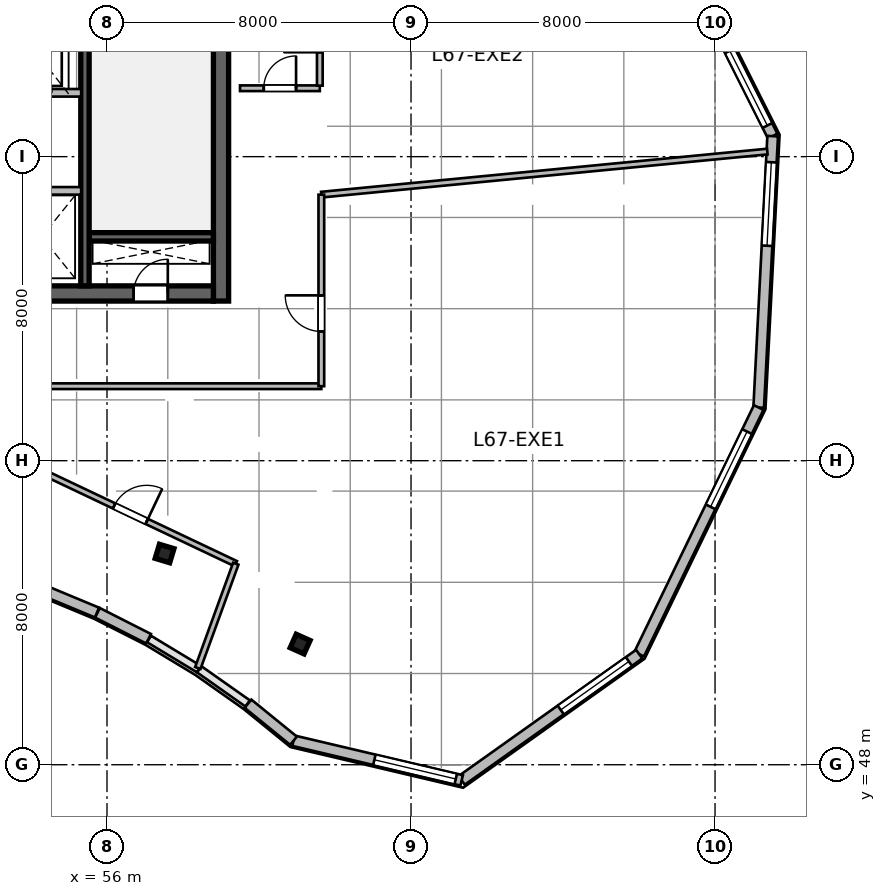
"""IFC4 building model, lengths in metres.
Left out: names, types, materials, properties, quantities, classifications, styles, units other than length and angle.
Written with IfcOpenShell. Run it as: python <this file> out.ifc"""

import sys

from ifc_helpers import new_model, si_unit, direction, frame, frame_2d, origin, origin_2d, place, context, subcontext, project, spatial, rectangle, i_section, extrude, source, transform, mapped, element, fill, save


model = new_model("IFC4")
c1 = context("Model", 3, precision=1e-05, world=origin(), true_north=direction((0.0, 1.0)))
c2 = subcontext(c1, "Body", "Model", "MODEL_VIEW")
j1 = project(units=[si_unit("LENGTHUNIT", "METRE"), si_unit("PLANEANGLEUNIT", "RADIAN")], contexts=[c1])
p1 = place(None, origin())
s1 = spatial("IfcSite", under=j1, at=p1, CompositionType="ELEMENT")
p2 = place(p1, origin())
s2 = spatial("IfcBuilding", under=s1, at=p2, CompositionType="ELEMENT")
p3 = place(p2, frame((0.0, 0.0, 275.7)))
s3 = spatial("IfcBuildingStorey", under=s2, at=p3, CompositionType="ELEMENT", Elevation=275.7)
m1 = source(origin(), c2, "Body", "SweptSolid", [
    extrude(rectangle(XDim=12.0, YDim=0.4, at=frame_2d((6.0, 0.0))), origin(), (0.0, 0.0, 1.0), 3.9),
])
p4 = place(p3, frame((59.0, 60.2, 0.0), z_axis=(0.0, 0.0, 1.0), x_axis=(0.0, 1.0, 0.0)))
e1 = element("IfcWall", 1, at=p4, inside=s3, PredefinedType="SHEAR", context=c2, shape_type="MappedRepresentation", body=[
    mapped(m1, transform((0.0, 0.0, 0.0), scale=1.0)),
])
m2 = source(origin(), c2, "Body", "SweptSolid", [
    extrude(rectangle(XDim=21.6, YDim=0.4, at=frame_2d((10.8, 0.0))), origin(), (0.0, 0.0, 1.0), 3.9),
])
p5 = place(p3, frame((37.2, 60.4, 0.0), z_axis=(0.0, 0.0, 1.0), x_axis=(1.0, 0.0, 0.0)))
e2 = element("IfcWall", 2, at=p5, inside=s3, PredefinedType="SHEAR", context=c2, shape_type="MappedRepresentation", body=[
    mapped(m2, transform((0.0, 0.0, 0.0), scale=1.0)),
])
p6 = place(p5, frame((1.1, 0.0, 0.0)))
e3 = element("IfcOpeningElement", 3, at=p6, cuts=e2, PredefinedType="OPENING", context=c2, shape_type="SweptSolid", body=[
    extrude(rectangle(XDim=1.15, YDim=2.15, at=frame_2d((0.575, 1.075))), frame((0.0, 0.21, 0.0), z_axis=(0.0, -1.0, 0.0), x_axis=(1.0, 0.0, 0.0)), (0.0, 0.0, 1.0), 0.42),
])
p7 = place(p5, frame((19.5, 0.0, 0.0)))
e4 = element("IfcOpeningElement", 4, at=p7, cuts=e2, PredefinedType="OPENING", context=c2, shape_type="SweptSolid", body=[
    extrude(rectangle(XDim=0.9, YDim=2.1, at=frame_2d((0.45, 1.05))), frame((0.0, 0.21, 0.0), z_axis=(0.0, -1.0, 0.0), x_axis=(1.0, 0.0, 0.0)), (0.0, 0.0, 1.0), 0.42),
])
p8 = place(p5, frame((12.02, 0.0, 0.0)))
e5 = element("IfcOpeningElement", 5, at=p8, cuts=e2, PredefinedType="OPENING", context=c2, shape_type="SweptSolid", body=[
    extrude(rectangle(XDim=1.6, YDim=2.15, at=frame_2d((0.8, 1.075))), frame((0.0, 0.21, 0.0), z_axis=(0.0, -1.0, 0.0), x_axis=(1.0, 0.0, 0.0)), (0.0, 0.0, 1.0), 0.42),
])
m3 = source(origin(), c2, "Body", "SweptSolid", [
    extrude(rectangle(XDim=3.27, YDim=0.22, at=frame_2d((1.635, 0.0))), origin(), (0.0, 0.0, 1.0), 3.9),
])
p9 = place(p3, frame((55.53, 61.89, 0.0), z_axis=(0.0, 0.0, 1.0), x_axis=(1.0, 0.0, 0.0)))
e6 = element("IfcWall", 6, at=p9, inside=s3, PredefinedType="SHEAR", context=c2, shape_type="MappedRepresentation", body=[
    mapped(m3, transform((0.0, 0.0, 0.0), scale=1.0)),
])
m4 = source(origin(), c2, "Body", "SweptSolid", [
    extrude(rectangle(XDim=11.2, YDim=0.22, at=frame_2d((5.6, 0.0))), origin(), (0.0, 0.0, 1.0), 3.9),
])
p10 = place(p3, frame((55.42, 60.6, 0.0), z_axis=(0.0, 0.0, 1.0), x_axis=(0.0, 1.0, 0.0)))
e7 = element("IfcWall", 7, at=p10, inside=s3, PredefinedType="SHEAR", context=c2, shape_type="MappedRepresentation", body=[
    mapped(m4, transform((0.0, 0.0, 0.0), scale=1.0)),
])
p11 = place(p10, frame((9.645, 0.0, 0.0)))
e8 = element("IfcOpeningElement", 8, at=p11, cuts=e7, PredefinedType="OPENING", context=c2, shape_type="SweptSolid", body=[
    extrude(rectangle(XDim=1.15, YDim=2.15, at=frame_2d((0.575, 1.075))), frame((0.0, 0.12, 0.0), z_axis=(0.0, -1.0, 0.0), x_axis=(1.0, 0.0, 0.0)), (0.0, 0.0, 1.0), 0.24),
])
m5 = source(origin(), c2, "Body", "SweptSolid", [
    extrude(i_section(OverallWidth=0.399, OverallDepth=0.387, WebThickness=0.021, FlangeThickness=0.033, at=origin_2d()), origin(), (0.0, 0.0, 1.0), 3.9),
])
for number, where, z_axis, x_axis in (
    (9, (57.515, 53.558, 0.0), (0.0, 0.0, 1.0), (0.289, 0.957, 0.0)),
    (10, (61.082, 51.175, 0.0), (0.0, 0.0, 1.0), (0.409, 0.912, 0.0)),
):
    element("IfcColumn", number, at=place(p3, frame(where, z_axis=z_axis, x_axis=x_axis)), inside=s3, PredefinedType="COLUMN", context=c2, shape_type="MappedRepresentation", body=[
        mapped(m5, transform((0.0, 0.0, 0.0), scale=1.0)),
    ])
m6 = source(origin(), c2, "Body", "SweptSolid", [
    extrude(rectangle(XDim=5.653, YDim=0.28, at=frame_2d((2.827, 0.0))), origin(), (0.0, 0.0, 1.0), 3.64),
])
p12 = place(p3, frame((70.976, 69.591, 0.0), z_axis=(0.0, 0.0, 1.0), x_axis=(0.449302555419, -0.893379658205, 0.0)))
e11 = element("IfcWall", 11, at=p12, inside=s3, PredefinedType="SOLIDWALL", context=c2, shape_type="MappedRepresentation", body=[
    mapped(m6, transform((0.0, 0.0, 0.0), scale=1.0)),
])
p13 = place(p12, frame((3.14, 0.0, 0.95)))
e12 = element("IfcOpeningElement", 12, at=p13, cuts=e11, PredefinedType="OPENING", context=c2, shape_type="SweptSolid", body=[
    extrude(rectangle(XDim=2.2, YDim=2.1, at=frame_2d((1.1, 1.05))), frame((0.0, 0.15, 0.0), z_axis=(0.0, -1.0, 0.0), x_axis=(1.0, 0.0, 0.0)), (0.0, 0.0, 1.0), 0.3),
])
m7 = source(origin(), c2, "Body", "SweptSolid", [
    extrude(rectangle(XDim=7.151, YDim=0.28, at=frame_2d((3.576, 0.0))), origin(), (0.0, 0.0, 1.0), 3.64),
])
p14 = place(p3, frame((73.516, 64.54, 0.0), z_axis=(0.0, 0.0, 1.0), x_axis=(-0.051449614265, -0.998675591567, 0.0)))
e13 = element("IfcWall", 13, at=p14, inside=s3, PredefinedType="SOLIDWALL", context=c2, shape_type="MappedRepresentation", body=[
    mapped(m7, transform((0.0, 0.0, 0.0), scale=1.0)),
])
p15 = place(p14, frame((0.688, 0.0, 0.95)))
e14 = element("IfcOpeningElement", 14, at=p15, cuts=e13, PredefinedType="OPENING", context=c2, shape_type="SweptSolid", body=[
    extrude(rectangle(XDim=2.2, YDim=2.1, at=frame_2d((1.1, 1.05))), frame((0.0, 0.15, 0.0), z_axis=(0.0, -1.0, 0.0), x_axis=(1.0, 0.0, 0.0)), (0.0, 0.0, 1.0), 0.3),
])
m8 = source(origin(), c2, "Body", "SweptSolid", [
    extrude(rectangle(XDim=7.211, YDim=0.28, at=frame_2d((3.606, 0.0))), origin(), (0.0, 0.0, 1.0), 3.64),
])
p16 = place(p3, frame((73.148, 57.399, 0.0), z_axis=(0.0, 0.0, 1.0), x_axis=(-0.436088263006, -0.899903898685, 0.0)))
e15 = element("IfcWall", 15, at=p16, inside=s3, PredefinedType="SOLIDWALL", context=c2, shape_type="MappedRepresentation", body=[
    mapped(m8, transform((0.0, 0.0, 0.0), scale=1.0)),
])
p17 = place(p16, frame((0.703, 0.0, 0.95)))
e16 = element("IfcOpeningElement", 16, at=p17, cuts=e15, PredefinedType="OPENING", context=c2, shape_type="SweptSolid", body=[
    extrude(rectangle(XDim=2.2, YDim=2.1, at=frame_2d((1.1, 1.05))), frame((0.0, 0.15, 0.0), z_axis=(0.0, -1.0, 0.0), x_axis=(1.0, 0.0, 0.0)), (0.0, 0.0, 1.0), 0.3),
])
m9 = source(origin(), c2, "Body", "SweptSolid", [
    extrude(rectangle(XDim=5.731, YDim=0.28, at=frame_2d((2.865, 0.0))), origin(), (0.0, 0.0, 1.0), 3.64),
])
p18 = place(p3, frame((70.004, 50.909, 0.0), z_axis=(0.0, 0.0, 1.0), x_axis=(-0.815021045908, -0.579431354629, 0.0)))
e17 = element("IfcWall", 17, at=p18, inside=s3, PredefinedType="SOLIDWALL", context=c2, shape_type="MappedRepresentation", body=[
    mapped(m9, transform((0.0, 0.0, 0.0), scale=1.0)),
])
p19 = place(p18, frame((0.333, 0.0, 0.95)))
e18 = element("IfcOpeningElement", 18, at=p19, cuts=e17, PredefinedType="OPENING", context=c2, shape_type="SweptSolid", body=[
    extrude(rectangle(XDim=2.2, YDim=2.1, at=frame_2d((1.1, 1.05))), frame((0.0, 0.15, 0.0), z_axis=(0.0, -1.0, 0.0), x_axis=(1.0, 0.0, 0.0)), (0.0, 0.0, 1.0), 0.3),
])
m10 = source(origin(), c2, "Body", "SweptSolid", [
    extrude(rectangle(XDim=4.547, YDim=0.28, at=frame_2d((2.273, 0.0))), origin(), (0.0, 0.0, 1.0), 3.64),
])
p20 = place(p3, frame((65.333, 47.589, 0.0), z_axis=(0.0, 0.0, 1.0), x_axis=(-0.973332593516, 0.229398479505, 0.0)))
e19 = element("IfcWall", 19, at=p20, inside=s3, PredefinedType="SOLIDWALL", context=c2, shape_type="MappedRepresentation", body=[
    mapped(m10, transform((0.0, 0.0, 0.0), scale=1.0)),
])
p21 = place(p20, frame((0.16, 0.0, 0.95)))
e20 = element("IfcOpeningElement", 20, at=p21, cuts=e19, PredefinedType="OPENING", context=c2, shape_type="SweptSolid", body=[
    extrude(rectangle(XDim=2.2, YDim=2.1, at=frame_2d((1.1, 1.05))), frame((0.0, 0.15, 0.0), z_axis=(0.0, -1.0, 0.0), x_axis=(1.0, 0.0, 0.0)), (0.0, 0.0, 1.0), 0.3),
])
m11 = source(origin(), c2, "Body", "SweptSolid", [
    extrude(rectangle(XDim=1.543, YDim=0.28, at=frame_2d((0.772, 0.0))), origin(), (0.0, 0.0, 1.0), 3.64),
])
p22 = place(p3, frame((60.908, 48.632, 0.0), z_axis=(0.0, 0.0, 1.0), x_axis=(-0.77582846857, 0.63094388606, 0.0)))
e21 = element("IfcWall", 21, at=p22, inside=s3, PredefinedType="SOLIDWALL", context=c2, shape_type="MappedRepresentation", body=[
    mapped(m11, transform((0.0, 0.0, 0.0), scale=1.0)),
])
m12 = source(origin(), c2, "Body", "SweptSolid", [
    extrude(rectangle(XDim=1.509, YDim=0.28, at=frame_2d((0.754, 0.0))), origin(), (0.0, 0.0, 1.0), 3.64),
])
p23 = place(p3, frame((57.094, 51.315, 0.0), z_axis=(0.0, 0.0, 1.0), x_axis=(-0.89169189228, 0.452642871635, 0.0)))
e22 = element("IfcWall", 22, at=p23, inside=s3, PredefinedType="SOLIDWALL", context=c2, shape_type="MappedRepresentation", body=[
    mapped(m12, transform((0.0, 0.0, 0.0), scale=1.0)),
])
m13 = source(origin(), c2, "Body", "SweptSolid", [
    extrude(rectangle(XDim=1.488, YDim=0.28, at=frame_2d((0.744, 0.0))), origin(), (0.0, 0.0, 1.0), 3.64),
])
p24 = place(p3, frame((55.736, 52.004, 0.0), z_axis=(0.0, 0.0, 1.0), x_axis=(-0.923261314935, 0.384172545017, 0.0)))
e23 = element("IfcWall", 23, at=p24, inside=s3, PredefinedType="SOLIDWALL", context=c2, shape_type="MappedRepresentation", body=[
    mapped(m13, transform((0.0, 0.0, 0.0), scale=1.0)),
])
m14 = source(origin(), c2, "Body", "SweptSolid", [
    extrude(rectangle(XDim=5.62, YDim=0.2, at=frame_2d((2.81, 0.0))), origin(), (0.0, 0.0, 1.0), 3.64),
])
p25 = place(p3, frame((49.7, 65.68, 0.0), z_axis=(0.0, 0.0, 1.0), x_axis=(1.0, 0.0, 0.0)))
e24 = element("IfcWall", 24, at=p25, inside=s3, PredefinedType="SOLIDWALL", context=c2, shape_type="MappedRepresentation", body=[
    mapped(m14, transform((0.0, 0.0, 0.0), scale=1.0)),
])
m15 = source(origin(), c2, "Body", "SweptSolid", [
    extrude(rectangle(XDim=4.1, YDim=0.2, at=frame_2d((2.05, 0.0))), origin(), (0.0, 0.0, 1.0), 3.64),
])
p26 = place(p3, frame((51.22, 63.1, 0.0), z_axis=(0.0, 0.0, 1.0), x_axis=(1.0, 0.0, 0.0)))
e25 = element("IfcWall", 25, at=p26, inside=s3, PredefinedType="SOLIDWALL", context=c2, shape_type="MappedRepresentation", body=[
    mapped(m15, transform((0.0, 0.0, 0.0), scale=1.0)),
])
m16 = source(origin(), c2, "Body", "SweptSolid", [
    extrude(rectangle(XDim=2.1, YDim=0.15, at=frame_2d((1.05, 0.0))), origin(), (0.0, 0.0, 1.0), 3.64),
])
p27 = place(p3, frame((59.5, 65.8, 0.0), z_axis=(0.0, 0.0, 1.0), x_axis=(1.0, 0.0, 0.0)))
e26 = element("IfcWall", 26, at=p27, inside=s3, PredefinedType="PARTITIONING", context=c2, shape_type="MappedRepresentation", body=[
    mapped(m16, transform((0.0, 0.0, 0.0), scale=1.0)),
])
p28 = place(p27, frame((0.625, 0.0, 0.0)))
e27 = element("IfcOpeningElement", 27, at=p28, cuts=e26, PredefinedType="OPENING", context=c2, shape_type="SweptSolid", body=[
    extrude(rectangle(XDim=0.85, YDim=2.1, at=frame_2d((0.425, 1.05))), frame((0.0, 0.085, 0.0), z_axis=(0.0, -1.0, 0.0), x_axis=(1.0, 0.0, 0.0)), (0.0, 0.0, 1.0), 0.17),
])
m17 = source(origin(), c2, "Body", "SweptSolid", [
    extrude(rectangle(XDim=3.565, YDim=0.15, at=frame_2d((1.783, 0.0))), origin(), (0.0, 0.0, 1.0), 3.64),
])
p29 = place(p3, frame((61.6, 65.867, 0.0), z_axis=(0.0, 0.0, 1.0), x_axis=(0.0, 1.0, 0.0)))
e28 = element("IfcWall", 28, at=p29, inside=s3, PredefinedType="PARTITIONING", context=c2, shape_type="MappedRepresentation", body=[
    mapped(m17, transform((0.0, 0.0, 0.0), scale=1.0)),
])
p30 = place(p29, frame((0.88, 0.0, 0.0)))
e29 = element("IfcOpeningElement", 29, at=p30, cuts=e28, PredefinedType="OPENING", context=c2, shape_type="SweptSolid", body=[
    extrude(rectangle(XDim=0.95, YDim=2.1, at=frame_2d((0.475, 1.05))), frame((0.0, 0.085, 0.0), z_axis=(0.0, -1.0, 0.0), x_axis=(1.0, 0.0, 0.0)), (0.0, 0.0, 1.0), 0.17),
])
m18 = source(origin(), c2, "Body", "SweptSolid", [
    extrude(rectangle(XDim=6.137, YDim=0.15, at=frame_2d((3.069, 0.0))), origin(), (0.0, 0.0, 1.0), 3.64),
])
p31 = place(p3, frame((53.844, 55.921, 0.0), z_axis=(0.0, 0.0, 1.0), x_axis=(0.903442784804, -0.428708682657, 0.0)))
e30 = element("IfcWall", 30, at=p31, inside=s3, PredefinedType="PARTITIONING", context=c2, shape_type="MappedRepresentation", body=[
    mapped(m18, transform((0.0, 0.0, 0.0), scale=1.0)),
])
p32 = place(p31, frame((2.594, 0.0, 0.0)))
e31 = element("IfcOpeningElement", 31, at=p32, cuts=e30, PredefinedType="OPENING", context=c2, shape_type="SweptSolid", body=[
    extrude(rectangle(XDim=0.95, YDim=2.1, at=frame_2d((0.475, 1.05))), frame((0.0, 0.085, 0.0), z_axis=(0.0, -1.0, 0.0), x_axis=(1.0, 0.0, 0.0)), (0.0, 0.0, 1.0), 0.17),
])
m19 = source(origin(), c2, "Body", "SweptSolid", [
    extrude(rectangle(XDim=2.921, YDim=0.15, at=frame_2d((1.46, 0.0))), origin(), (0.0, 0.0, 1.0), 3.64),
])
p33 = place(p3, frame((58.39, 50.545, 0.0), z_axis=(0.0, 0.0, 1.0), x_axis=(0.34203834657, 0.939685995147, 0.0)))
e32 = element("IfcWall", 32, at=p33, inside=s3, PredefinedType="PARTITIONING", context=c2, shape_type="MappedRepresentation", body=[
    mapped(m19, transform((0.0, 0.0, 0.0), scale=1.0)),
])
m20 = source(origin(), c2, "Body", "SweptSolid", [
    extrude(rectangle(XDim=12.39, YDim=0.15, at=frame_2d((6.195, 0.0))), origin(), (0.0, 0.0, 1.0), 3.27),
])
p34 = place(p3, frame((49.25, 57.96, 0.0), z_axis=(0.0, 0.0, 1.0), x_axis=(1.0, 0.0, 0.0)))
e33 = element("IfcWall", 33, at=p34, inside=s3, PredefinedType="PARTITIONING", context=c2, shape_type="MappedRepresentation", body=[
    mapped(m20, transform((0.0, 0.0, 0.0), scale=1.0)),
])
m21 = source(origin(), c2, "Body", "SweptSolid", [
    extrude(rectangle(XDim=11.79, YDim=0.15, at=frame_2d((5.895, 0.0))), origin(), (0.0, 0.0, 1.0), 3.64),
])
p35 = place(p3, frame((61.64, 63.0, 0.0), z_axis=(0.0, 0.0, 1.0), x_axis=(0.995363389039, 0.096185881295, 0.0)))
e34 = element("IfcWall", 34, at=p35, inside=s3, PredefinedType="PARTITIONING", context=c2, shape_type="MappedRepresentation", body=[
    mapped(m21, transform((0.0, 0.0, 0.0), scale=1.0)),
])
m22 = source(origin(), c2, "Body", "SweptSolid", [
    extrude(rectangle(XDim=5.04, YDim=0.15, at=frame_2d((2.52, 0.0))), origin(), (0.0, 0.0, 1.0), 3.64),
])
p36 = place(p3, frame((61.64, 57.96, 0.0), z_axis=(0.0, 0.0, 1.0), x_axis=(0.0, 1.0, 0.0)))
e35 = element("IfcWall", 35, at=p36, inside=s3, PredefinedType="PARTITIONING", context=c2, shape_type="MappedRepresentation", body=[
    mapped(m22, transform((0.0, 0.0, 0.0), scale=1.0)),
])
p37 = place(p36, frame((1.44, 0.0, 0.0)))
e36 = element("IfcOpeningElement", 36, at=p37, cuts=e35, PredefinedType="OPENING", context=c2, shape_type="SweptSolid", body=[
    extrude(rectangle(XDim=0.95, YDim=2.1, at=frame_2d((0.475, 1.05))), frame((0.0, 0.085, 0.0), z_axis=(0.0, -1.0, 0.0), x_axis=(1.0, 0.0, 0.0)), (0.0, 0.0, 1.0), 0.17),
])
m23 = source(origin(), c2, "Body", "SweptSolid", [
    extrude(rectangle(XDim=2.2, YDim=2.1, at=frame_2d((1.1, 1.05))), frame((0.0, 0.03, 0.0), z_axis=(0.0, -1.0, 0.0), x_axis=(1.0, 0.0, 0.0)), (0.0, 0.0, 1.0), 0.06),
])
p38 = place(p13, origin())
e37 = element("IfcWindow", 37, at=p38, inside=s3, PartitioningType="TRIPLE_PANEL_VERTICAL", PredefinedType="WINDOW", context=c2, shape_type="MappedRepresentation", body=[
    mapped(m23, transform((0.0, 0.0, 0.0), scale=1.0)),
])
fill(e12, e37)
p39 = place(p15, origin())
e38 = element("IfcWindow", 38, at=p39, inside=s3, PartitioningType="TRIPLE_PANEL_VERTICAL", PredefinedType="WINDOW", context=c2, shape_type="MappedRepresentation", body=[
    mapped(m23, transform((0.0, 0.0, 0.0), scale=1.0)),
])
fill(e14, e38)
p40 = place(p17, origin())
e39 = element("IfcWindow", 39, at=p40, inside=s3, PartitioningType="TRIPLE_PANEL_VERTICAL", PredefinedType="WINDOW", context=c2, shape_type="MappedRepresentation", body=[
    mapped(m23, transform((0.0, 0.0, 0.0), scale=1.0)),
])
fill(e16, e39)
p41 = place(p19, origin())
e40 = element("IfcWindow", 40, at=p41, inside=s3, PartitioningType="TRIPLE_PANEL_VERTICAL", PredefinedType="WINDOW", context=c2, shape_type="MappedRepresentation", body=[
    mapped(m23, transform((0.0, 0.0, 0.0), scale=1.0)),
])
fill(e18, e40)
p42 = place(p21, origin())
e41 = element("IfcWindow", 41, at=p42, inside=s3, PartitioningType="TRIPLE_PANEL_VERTICAL", PredefinedType="WINDOW", context=c2, shape_type="MappedRepresentation", body=[
    mapped(m23, transform((0.0, 0.0, 0.0), scale=1.0)),
])
fill(e20, e41)
m24 = source(origin(), c2, "Body", "SweptSolid", [
    extrude(rectangle(XDim=0.9, YDim=2.1, at=frame_2d((0.45, 1.05))), frame((0.0, 0.025, 0.0), z_axis=(0.0, -1.0, 0.0), x_axis=(1.0, 0.0, 0.0)), (0.0, 0.0, 1.0), 0.05),
])
p43 = place(p7, origin())
e42 = element("IfcDoor", 42, at=p43, inside=s3, OperationType="SINGLE_SWING_RIGHT", PredefinedType="DOOR", context=c2, shape_type="MappedRepresentation", body=[
    mapped(m24, transform((0.0, 0.0, 0.0), scale=1.0)),
])
fill(e4, e42)
m25 = source(origin(), c2, "Body", "SweptSolid", [
    extrude(rectangle(XDim=0.85, YDim=2.1, at=frame_2d((0.425, 1.05))), frame((0.0, 0.025, 0.0), z_axis=(0.0, -1.0, 0.0), x_axis=(1.0, 0.0, 0.0)), (0.0, 0.0, 1.0), 0.05),
])
p44 = place(p28, origin())
e43 = element("IfcDoor", 43, at=p44, inside=s3, OperationType="SINGLE_SWING_RIGHT", PredefinedType="DOOR", context=c2, shape_type="MappedRepresentation", body=[
    mapped(m25, transform((0.0, 0.0, 0.0), scale=1.0)),
])
fill(e27, e43)
m26 = source(origin(), c2, "Body", "SweptSolid", [
    extrude(rectangle(XDim=0.95, YDim=2.1, at=frame_2d((0.475, 1.05))), frame((0.0, 0.025, 0.0), z_axis=(0.0, -1.0, 0.0), x_axis=(1.0, 0.0, 0.0)), (0.0, 0.0, 1.0), 0.05),
])
p45 = place(p32, origin())
e44 = element("IfcDoor", 44, at=p45, inside=s3, OperationType="SINGLE_SWING_RIGHT", PredefinedType="DOOR", context=c2, shape_type="MappedRepresentation", body=[
    mapped(m26, transform((0.0, 0.0, 0.0), scale=1.0)),
])
fill(e31, e44)
p46 = place(p37, origin())
e45 = element("IfcDoor", 45, at=p46, inside=s3, OperationType="SINGLE_SWING_RIGHT", PredefinedType="DOOR", context=c2, shape_type="MappedRepresentation", body=[
    mapped(m26, transform((0.0, 0.0, 0.0), scale=1.0)),
])
fill(e36, e45)
p47 = place(p30, origin())
e46 = element("IfcDoor", 46, at=p47, inside=s3, OperationType="SINGLE_SWING_LEFT", PredefinedType="DOOR", context=c2, shape_type="MappedRepresentation", body=[
    mapped(m26, transform((0.0, 0.0, 0.0), scale=1.0)),
])
fill(e29, e46)
save(model, sys.argv[1])
